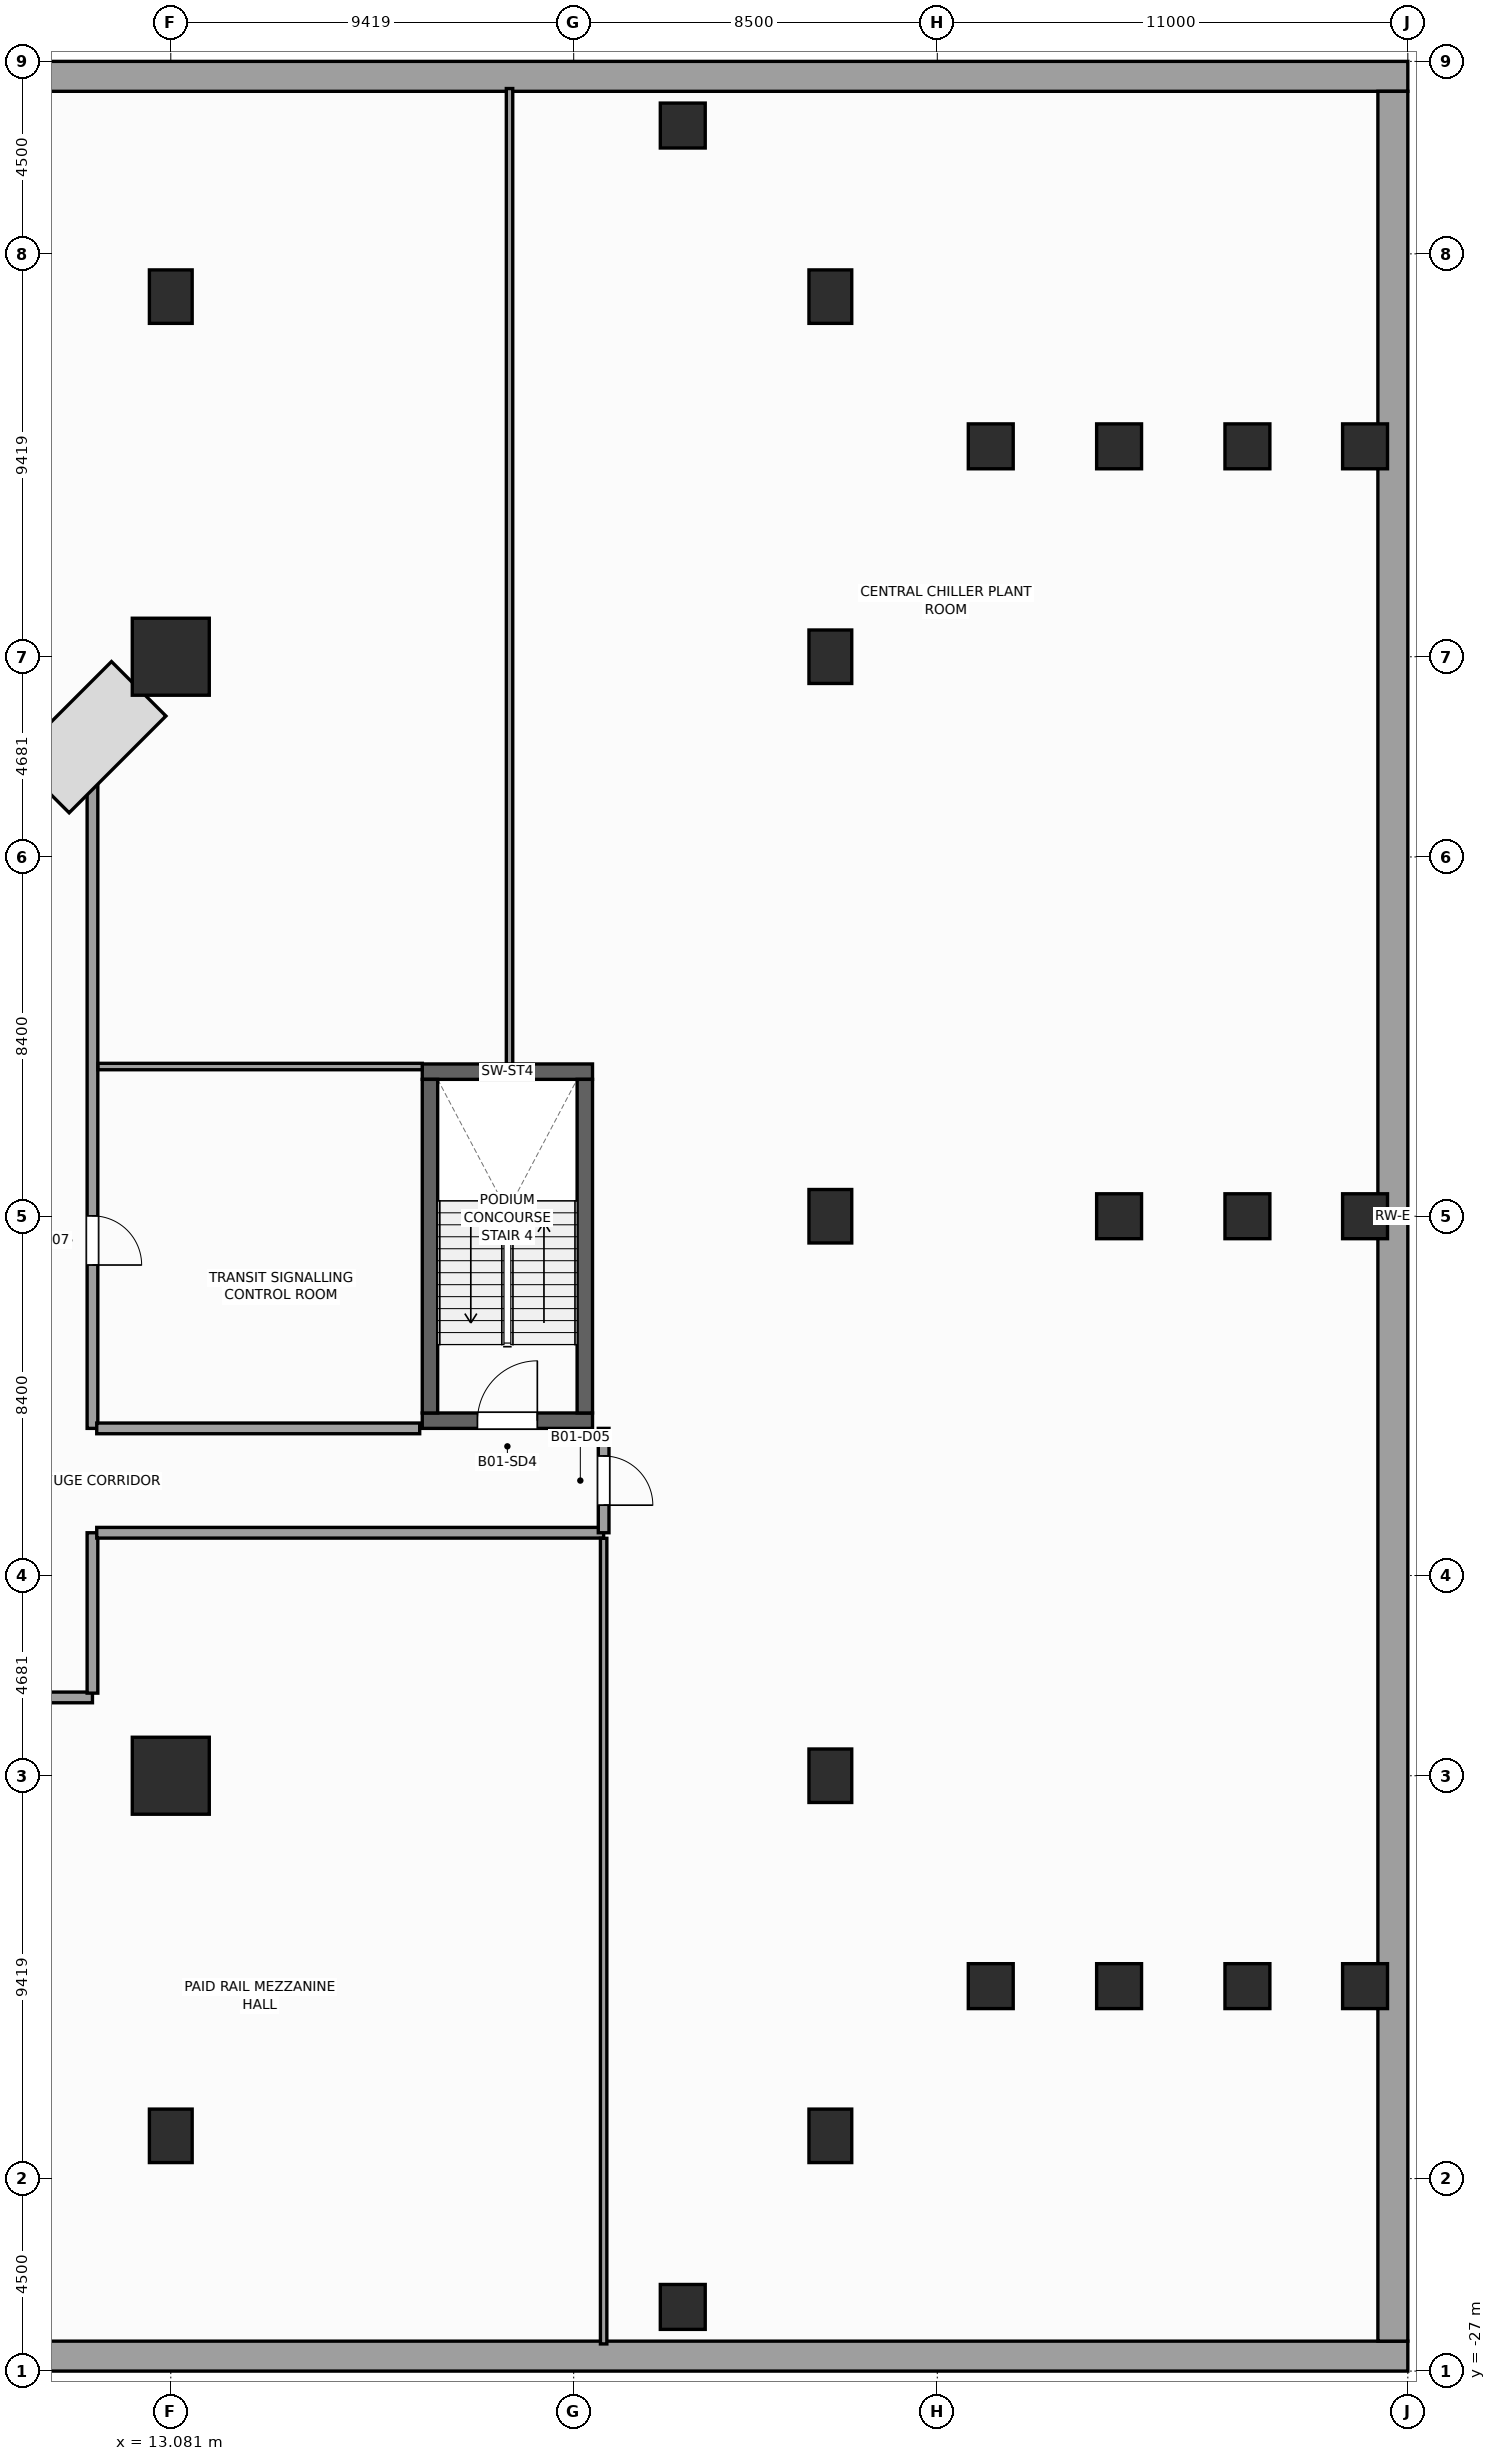
"""IFC4 building model, lengths in metres.
Left out: names, types, materials, properties, quantities, classifications, styles, units other than length and angle.
Written with IfcOpenShell. Run it as: python <this file> out.ifc"""

import sys

from ifc_helpers import new_model, si_unit, direction, frame, frame_2d, origin, origin_2d, place, context, subcontext, project, spatial, rectangle, extrude, source, transform, mapped, element, fill, save


model = new_model("IFC4")
c1 = context("Model", 3, precision=1e-05, world=origin(), true_north=direction((0.0, 1.0)))
c2 = subcontext(c1, "Body", "Model", "MODEL_VIEW")
j1 = project(units=[si_unit("LENGTHUNIT", "METRE"), si_unit("PLANEANGLEUNIT", "RADIAN")], contexts=[c1])
p1 = place(None, origin())
s1 = spatial("IfcSite", under=j1, at=p1, CompositionType="ELEMENT")
p2 = place(p1, origin())
s2 = spatial("IfcBuilding", under=s1, at=p2, CompositionType="ELEMENT")
p3 = place(p2, frame((0.0, 0.0, -4.5)))
s3 = spatial("IfcBuildingStorey", under=s2, at=p3, CompositionType="ELEMENT", Elevation=-4.5)
p4 = place(p3, frame((18.96, -4.78, 0.0), z_axis=(0.0, 0.0, 1.0), x_axis=(1.0, 0.0, 0.0)))
e1 = element("IfcWall", 1, at=p4, inside=s3, PredefinedType="SHEAR", context=c2, shape_type="SweptSolid", body=[
    extrude(rectangle(XDim=3.98, YDim=0.36, at=frame_2d((1.99, 0.0))), origin(), (0.0, 0.0, 1.0), 4.5),
])
p5 = place(p4, frame((1.29, 0.0, 0.0)))
e2 = element("IfcOpeningElement", 2, at=p5, cuts=e1, PredefinedType="OPENING", context=c2, shape_type="SweptSolid", body=[
    extrude(rectangle(XDim=1.4, YDim=2.2, at=frame_2d((0.7, 1.1))), frame((0.0, 0.19, 0.0), z_axis=(0.0, -1.0, 0.0), x_axis=(1.0, 0.0, 0.0)), (0.0, 0.0, 1.0), 0.38),
])
p6 = place(p3, frame((18.96, 3.38, 0.0), z_axis=(0.0, 0.0, 1.0), x_axis=(1.0, 0.0, 0.0)))
e3 = element("IfcWall", 3, at=p6, inside=s3, PredefinedType="SHEAR", context=c2, shape_type="SweptSolid", body=[
    extrude(rectangle(XDim=3.98, YDim=0.36, at=frame_2d((1.99, 0.0))), origin(), (0.0, 0.0, 1.0), 4.5),
])
for number, where, z_axis, x_axis in (
    (4, (19.14, -4.6, 0.0), (0.0, 0.0, 1.0), (0.0, 1.0, 0.0)),
    (5, (22.76, -4.6, 0.0), (0.0, 0.0, 1.0), (0.0, 1.0, 0.0)),
):
    element("IfcWall", number, at=place(p3, frame(where, z_axis=z_axis, x_axis=x_axis)), inside=s3, PredefinedType="SHEAR", context=c2, shape_type="SweptSolid", body=[
        extrude(rectangle(XDim=7.8, YDim=0.36, at=frame_2d((3.9, 0.0))), origin(), (0.0, 0.0, 1.0), 4.5),
    ])
for number, where, z_axis, x_axis in (
    (6, (-42.0, -26.65, 0.0), (0.0, 0.0, 1.0), (1.0, 0.0, 0.0)),
    (7, (-42.0, 26.65, 0.0), (0.0, 0.0, 1.0), (1.0, 0.0, 0.0)),
):
    element("IfcWall", number, at=place(p3, frame(where, z_axis=z_axis, x_axis=x_axis)), inside=s3, PredefinedType="USERDEFINED", context=c2, shape_type="SweptSolid", body=[
        extrude(rectangle(XDim=84.0, YDim=0.7, at=frame_2d((42.0, 0.0))), origin(), (0.0, 0.0, 1.0), 4.5),
    ])
p7 = place(p3, frame((41.65, -26.3, 0.0), z_axis=(0.0, 0.0, 1.0), x_axis=(0.0, 1.0, 0.0)))
e8 = element("IfcWall", 8, at=p7, inside=s3, PredefinedType="USERDEFINED", context=c2, shape_type="SweptSolid", body=[
    extrude(rectangle(XDim=52.6, YDim=0.7, at=frame_2d((26.3, 0.0))), origin(), (0.0, 0.0, 1.0), 4.5),
])
m1 = source(origin(), c2, "Body", "SweptSolid", [
    extrude(rectangle(XDim=1.8, YDim=1.8, at=origin_2d()), origin(), (0.0, 0.0, 1.0), 4.5),
])
for number, where, z_axis, x_axis in (
    (9, (13.081, -13.081, 0.0), (0.0, 0.0, 1.0), (1.0, 0.0, 0.0)),
    (10, (13.081, 13.081, 0.0), (0.0, 0.0, 1.0), (1.0, 0.0, 0.0)),
):
    element("IfcColumn", number, at=place(p3, frame(where, z_axis=z_axis, x_axis=x_axis)), inside=s3, PredefinedType="COLUMN", context=c2, shape_type="MappedRepresentation", body=[
        mapped(m1, transform((0.0, 0.0, 0.0), scale=1.0)),
    ])
m2 = source(origin(), c2, "Body", "SweptSolid", [
    extrude(rectangle(XDim=1.0, YDim=1.25, at=origin_2d()), origin(), (0.0, 0.0, 1.0), 4.5),
])
for number, where, z_axis, x_axis in (
    (11, (13.081, -21.5, 0.0), (0.0, 0.0, 1.0), (1.0, 0.0, 0.0)),
    (12, (28.5, -21.5, 0.0), (0.0, 0.0, 1.0), (1.0, 0.0, 0.0)),
    (13, (13.081, 21.5, 0.0), (0.0, 0.0, 1.0), (1.0, 0.0, 0.0)),
    (14, (28.5, 21.5, 0.0), (0.0, 0.0, 1.0), (1.0, 0.0, 0.0)),
    (15, (28.5, -13.081, 0.0), (0.0, 0.0, 1.0), (1.0, 0.0, 0.0)),
    (16, (28.5, 0.0, 0.0), (0.0, 0.0, 1.0), (1.0, 0.0, 0.0)),
    (17, (28.5, 13.081, 0.0), (0.0, 0.0, 1.0), (1.0, 0.0, 0.0)),
):
    element("IfcColumn", number, at=place(p3, frame(where, z_axis=z_axis, x_axis=x_axis)), inside=s3, PredefinedType="COLUMN", context=c2, shape_type="MappedRepresentation", body=[
        mapped(m2, transform((0.0, 0.0, 0.0), scale=1.0)),
    ])
m3 = source(origin(), c2, "Body", "SweptSolid", [
    extrude(rectangle(XDim=1.05, YDim=1.05, at=origin_2d()), origin(), (0.0, 0.0, 1.0), 4.5),
])
for number, where, z_axis, x_axis in (
    (18, (25.05, -25.5, 0.0), (0.0, 0.0, 1.0), (1.0, 0.0, 0.0)),
    (19, (25.05, 25.5, 0.0), (0.0, 0.0, 1.0), (1.0, 0.0, 0.0)),
    (20, (32.25, -18.0, 0.0), (0.0, 0.0, 1.0), (1.0, 0.0, 0.0)),
    (21, (32.25, 18.0, 0.0), (0.0, 0.0, 1.0), (1.0, 0.0, 0.0)),
    (22, (35.25, -18.0, 0.0), (0.0, 0.0, 1.0), (1.0, 0.0, 0.0)),
    (23, (35.25, 0.0, 0.0), (0.0, 0.0, 1.0), (1.0, 0.0, 0.0)),
    (24, (35.25, 18.0, 0.0), (0.0, 0.0, 1.0), (1.0, 0.0, 0.0)),
    (25, (38.25, -18.0, 0.0), (0.0, 0.0, 1.0), (1.0, 0.0, 0.0)),
    (26, (38.25, 0.0, 0.0), (0.0, 0.0, 1.0), (1.0, 0.0, 0.0)),
    (27, (38.25, 18.0, 0.0), (0.0, 0.0, 1.0), (1.0, 0.0, 0.0)),
    (28, (41.0, -18.0, 0.0), (0.0, 0.0, 1.0), (1.0, 0.0, 0.0)),
    (29, (41.0, 0.0, 0.0), (0.0, 0.0, 1.0), (1.0, 0.0, 0.0)),
    (30, (41.0, 18.0, 0.0), (0.0, 0.0, 1.0), (1.0, 0.0, 0.0)),
):
    element("IfcColumn", number, at=place(p3, frame(where, z_axis=z_axis, x_axis=x_axis)), inside=s3, PredefinedType="COLUMN", context=c2, shape_type="MappedRepresentation", body=[
        mapped(m3, transform((0.0, 0.0, 0.0), scale=1.0)),
    ])
p8 = place(p3, frame((-11.25, -11.25, 0.0), z_axis=(0.0, 0.0, 1.0), x_axis=(1.0, 0.0, 0.0)))
e31 = element("IfcWall", 31, at=p8, inside=s3, PredefinedType="PARTITIONING", context=c2, shape_type="SweptSolid", body=[
    extrude(rectangle(XDim=22.5, YDim=0.25, at=frame_2d((11.25, 0.0))), origin(), (0.0, 0.0, 1.0), 4.1),
])
p9 = place(p8, frame((1.605, 0.0, 0.0)))
e32 = element("IfcOpeningElement", 32, at=p9, cuts=e31, PredefinedType="OPENING", context=c2, shape_type="SweptSolid", body=[
    extrude(rectangle(XDim=0.95, YDim=2.1, at=frame_2d((0.475, 1.05))), frame((0.0, 0.135, 0.0), z_axis=(0.0, -1.0, 0.0), x_axis=(1.0, 0.0, 0.0)), (0.0, 0.0, 1.0), 0.27),
])
p10 = place(p8, frame((12.12, 0.0, 0.0)))
e33 = element("IfcOpeningElement", 33, at=p10, cuts=e31, PredefinedType="OPENING", context=c2, shape_type="SweptSolid", body=[
    extrude(rectangle(XDim=1.15, YDim=2.25, at=frame_2d((0.575, 1.125))), frame((0.0, 0.135, 0.0), z_axis=(0.0, -1.0, 0.0), x_axis=(1.0, 0.0, 0.0)), (0.0, 0.0, 1.0), 0.27),
])
p11 = place(p3, frame((-11.25, 11.25, 0.0), z_axis=(0.0, 0.0, 1.0), x_axis=(1.0, 0.0, 0.0)))
e34 = element("IfcWall", 34, at=p11, inside=s3, PredefinedType="PARTITIONING", context=c2, shape_type="SweptSolid", body=[
    extrude(rectangle(XDim=22.5, YDim=0.25, at=frame_2d((11.25, 0.0))), origin(), (0.0, 0.0, 1.0), 4.1),
])
p12 = place(p11, frame((10.675, 0.0, 0.0)))
e35 = element("IfcOpeningElement", 35, at=p12, cuts=e34, PredefinedType="OPENING", context=c2, shape_type="SweptSolid", body=[
    extrude(rectangle(XDim=1.15, YDim=2.25, at=frame_2d((0.575, 1.125))), frame((0.0, 0.135, 0.0), z_axis=(0.0, -1.0, 0.0), x_axis=(1.0, 0.0, 0.0)), (0.0, 0.0, 1.0), 0.27),
])
p13 = place(p3, frame((11.25, -11.15, 0.0), z_axis=(0.0, 0.0, 1.0), x_axis=(0.0, 1.0, 0.0)))
e36 = element("IfcWall", 36, at=p13, inside=s3, PredefinedType="PARTITIONING", context=c2, shape_type="SweptSolid", body=[
    extrude(rectangle(XDim=3.75, YDim=0.25, at=frame_2d((1.875, 0.0))), origin(), (0.0, 0.0, 1.0), 4.1),
])
p14 = place(p3, frame((11.25, -4.96, 0.0), z_axis=(0.0, 0.0, 1.0), x_axis=(0.0, 1.0, 0.0)))
e37 = element("IfcWall", 37, at=p14, inside=s3, PredefinedType="PARTITIONING", context=c2, shape_type="SweptSolid", body=[
    extrude(rectangle(XDim=16.11, YDim=0.25, at=frame_2d((8.055, 0.0))), origin(), (0.0, 0.0, 1.0), 4.1),
])
p15 = place(p14, frame((3.82, 0.0, 0.0)))
e38 = element("IfcOpeningElement", 38, at=p15, cuts=e37, PredefinedType="OPENING", context=c2, shape_type="SweptSolid", body=[
    extrude(rectangle(XDim=1.15, YDim=2.25, at=frame_2d((0.575, 1.125))), frame((0.0, 0.135, 0.0), z_axis=(0.0, -1.0, 0.0), x_axis=(1.0, 0.0, 0.0)), (0.0, 0.0, 1.0), 0.27),
])
p16 = place(p3, frame((11.35, -7.4, 0.0), z_axis=(0.0, 0.0, 1.0), x_axis=(1.0, 0.0, 0.0)))
e39 = element("IfcWall", 39, at=p16, inside=s3, PredefinedType="PARTITIONING", context=c2, shape_type="SweptSolid", body=[
    extrude(rectangle(XDim=11.85, YDim=0.25, at=frame_2d((5.925, 0.0))), origin(), (0.0, 0.0, 1.0), 4.1),
])
p17 = place(p3, frame((11.35, -4.96, 0.0), z_axis=(0.0, 0.0, 1.0), x_axis=(1.0, 0.0, 0.0)))
e40 = element("IfcWall", 40, at=p17, inside=s3, PredefinedType="PARTITIONING", context=c2, shape_type="SweptSolid", body=[
    extrude(rectangle(XDim=7.55, YDim=0.25, at=frame_2d((3.775, 0.0))), origin(), (0.0, 0.0, 1.0), 4.1),
])
p18 = place(p3, frame((23.2, -7.4, 0.0), z_axis=(0.0, 0.0, 1.0), x_axis=(0.0, 1.0, 0.0)))
e41 = element("IfcWall", 41, at=p18, inside=s3, PredefinedType="PARTITIONING", context=c2, shape_type="SweptSolid", body=[
    extrude(rectangle(XDim=2.44, YDim=0.25, at=frame_2d((1.22, 0.0))), origin(), (0.0, 0.0, 1.0), 4.1),
])
p19 = place(p18, frame((0.645, 0.0, 0.0)))
e42 = element("IfcOpeningElement", 42, at=p19, cuts=e41, PredefinedType="OPENING", context=c2, shape_type="SweptSolid", body=[
    extrude(rectangle(XDim=1.15, YDim=2.25, at=frame_2d((0.575, 1.125))), frame((0.0, 0.135, 0.0), z_axis=(0.0, -1.0, 0.0), x_axis=(1.0, 0.0, 0.0)), (0.0, 0.0, 1.0), 0.27),
])
p20 = place(p3, frame((23.2, -26.365, 0.0), z_axis=(0.0, 0.0, 1.0), x_axis=(0.0, 1.0, 0.0)))
e43 = element("IfcWall", 43, at=p20, inside=s3, PredefinedType="PARTITIONING", context=c2, shape_type="SweptSolid", body=[
    extrude(rectangle(XDim=18.835, YDim=0.15, at=frame_2d((9.417, 0.0))), origin(), (0.0, 0.0, 1.0), 4.1),
])
p21 = place(p3, frame((21.0, 3.56, 0.0), z_axis=(0.0, 0.0, 1.0), x_axis=(0.0, 1.0, 0.0)))
e44 = element("IfcWall", 44, at=p21, inside=s3, PredefinedType="PARTITIONING", context=c2, shape_type="SweptSolid", body=[
    extrude(rectangle(XDim=22.805, YDim=0.15, at=frame_2d((11.402, 0.0))), origin(), (0.0, 0.0, 1.0), 4.1),
])
p22 = place(p3, frame((11.38, 3.5, 0.0), z_axis=(0.0, 0.0, 1.0), x_axis=(1.0, 0.0, 0.0)))
e45 = element("IfcWall", 45, at=p22, inside=s3, PredefinedType="PARTITIONING", context=c2, shape_type="SweptSolid", body=[
    extrude(rectangle(XDim=7.58, YDim=0.15, at=frame_2d((3.79, 0.0))), origin(), (0.0, 0.0, 1.0), 4.1),
])
m4 = source(origin(), c2, "Body", "SweptSolid", [
    extrude(rectangle(XDim=1.4, YDim=2.2, at=frame_2d((0.7, 1.1))), frame((0.0, 0.025, 0.0), z_axis=(0.0, -1.0, 0.0), x_axis=(1.0, 0.0, 0.0)), (0.0, 0.0, 1.0), 0.05),
])
p23 = place(p5, origin())
e46 = element("IfcDoor", 46, at=p23, inside=s3, OperationType="SINGLE_SWING_RIGHT", PredefinedType="DOOR", context=c2, shape_type="MappedRepresentation", body=[
    mapped(m4, transform((0.0, 0.0, 0.0), scale=1.0)),
])
fill(e2, e46)
m5 = source(origin(), c2, "Body", "SweptSolid", [
    extrude(rectangle(XDim=1.15, YDim=2.25, at=frame_2d((0.575, 1.125))), frame((0.0, 0.025, 0.0), z_axis=(0.0, -1.0, 0.0), x_axis=(1.0, 0.0, 0.0)), (0.0, 0.0, 1.0), 0.05),
])
p24 = place(p19, frame((1.15, 0.0, 0.0), z_axis=(0.0, 0.0, 1.0), x_axis=(-1.0, 0.0, 0.0)))
e47 = element("IfcDoor", 47, at=p24, inside=s3, OperationType="SINGLE_SWING_LEFT", PredefinedType="DOOR", context=c2, shape_type="MappedRepresentation", body=[
    mapped(m5, transform((0.0, 0.0, 0.0), scale=1.0)),
])
fill(e42, e47)
p25 = place(p15, frame((1.15, 0.0, 0.0), z_axis=(0.0, 0.0, 1.0), x_axis=(-1.0, 0.0, 0.0)))
e48 = element("IfcDoor", 48, at=p25, inside=s3, OperationType="SINGLE_SWING_LEFT", PredefinedType="DOOR", context=c2, shape_type="MappedRepresentation", body=[
    mapped(m5, transform((0.0, 0.0, 0.0), scale=1.0)),
])
fill(e38, e48)
save(model, sys.argv[1])
